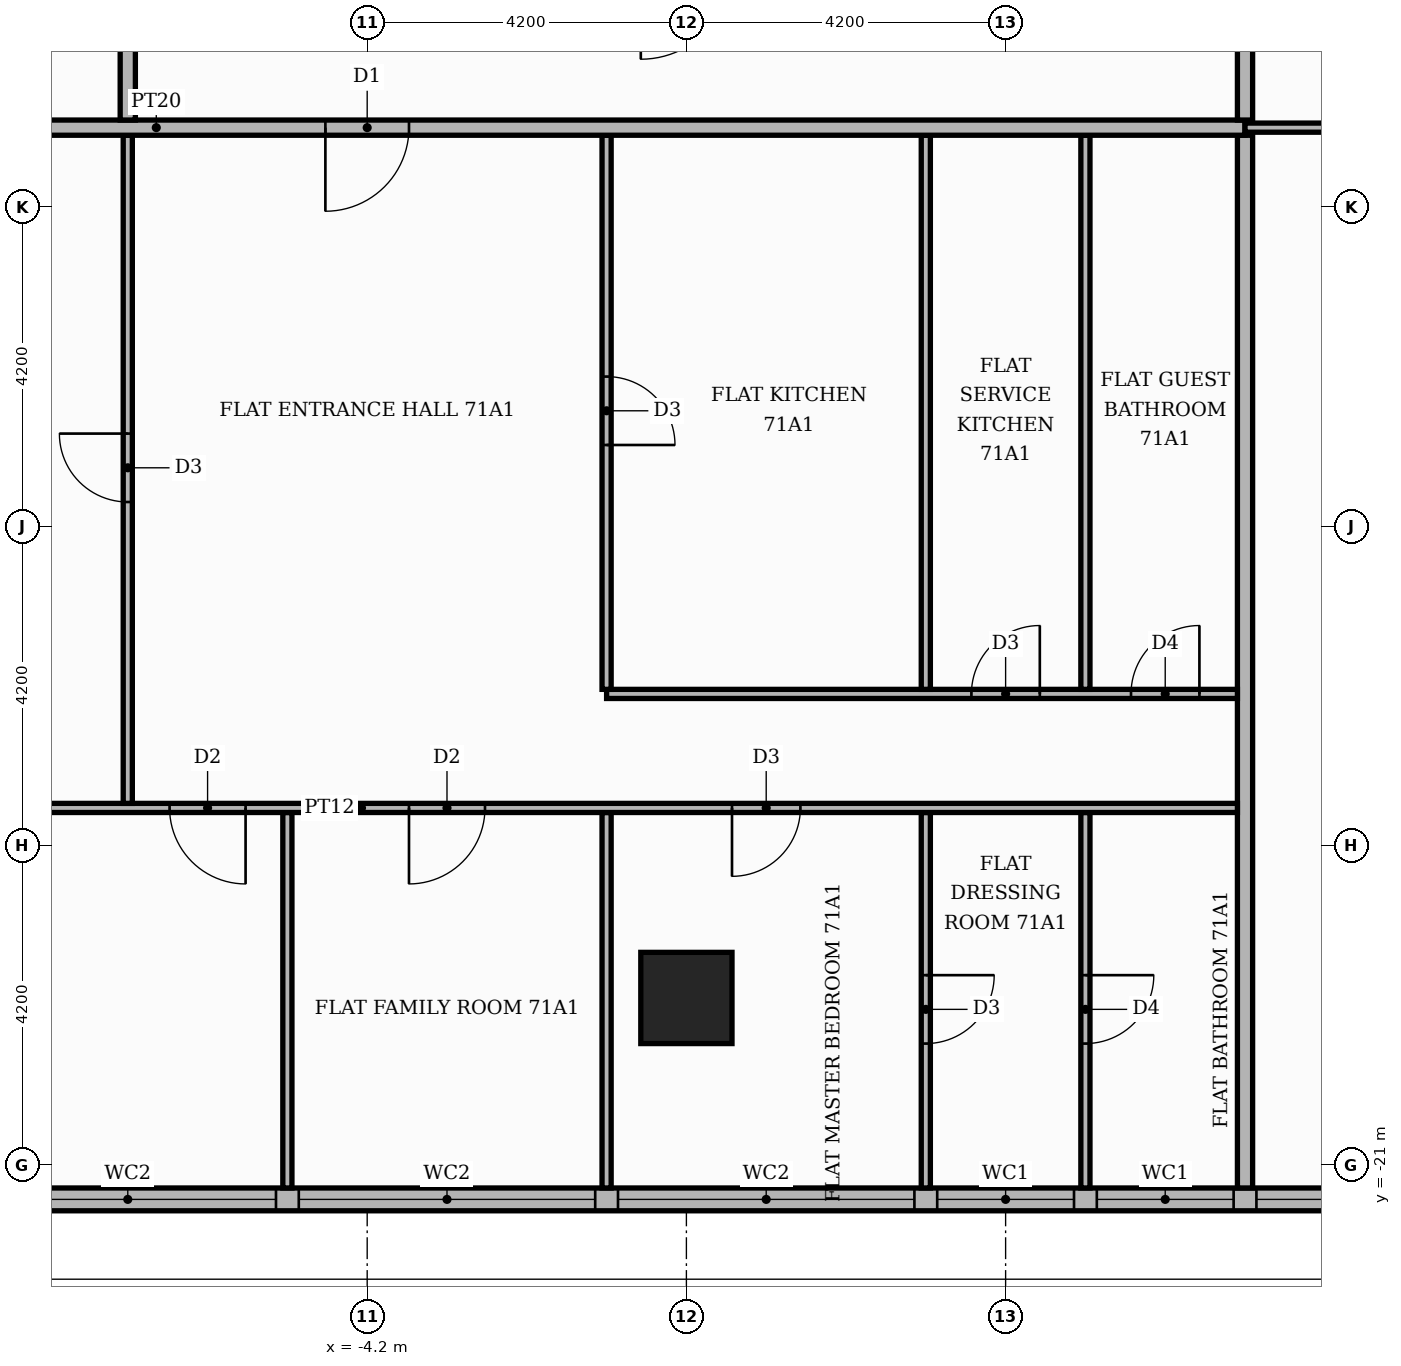
"""IFC4 building model, lengths in metres.
Left out: names, types, materials, properties, quantities, classifications, styles, units other than length and angle.
Written with IfcOpenShell. Run it as: python <this file> out.ifc"""

import sys

from ifc_helpers import new_model, si_unit, direction, frame, frame_2d, origin, origin_2d, place, context, subcontext, project, spatial, rectangle, extrude, element, fill, save


model = new_model("IFC4")
c1 = context("Model", 3, precision=1e-05, world=origin(), true_north=direction((0.0, 1.0)))
c2 = subcontext(c1, "Body", "Model", "MODEL_VIEW")
j1 = project(units=[si_unit("LENGTHUNIT", "METRE"), si_unit("PLANEANGLEUNIT", "RADIAN")], contexts=[c1])
p1 = place(None, origin())
s1 = spatial("IfcSite", under=j1, at=p1, CompositionType="ELEMENT")
p2 = place(p1, origin())
s2 = spatial("IfcBuilding", under=s1, at=p2, CompositionType="ELEMENT")
p3 = place(p2, frame((0.0, 0.0, 296.7)))
s3 = spatial("IfcBuildingStorey", under=s2, at=p3, CompositionType="ELEMENT", Elevation=296.7)
p4 = place(p3, frame((0.0, -18.8, 0.0), z_axis=(0.0, 0.0, 1.0), x_axis=(1.0, 0.0, 0.0)))
e1 = element("IfcColumn", 1, at=p4, inside=s3, PredefinedType="COLUMN", context=c2, shape_type="SweptSolid", body=[
    extrude(rectangle(XDim=1.2, YDim=1.2, at=origin_2d()), origin(), (0.0, 0.0, 1.0), 3.9),
])
p5 = place(p3, frame((-15.8, -21.45, 0.0), z_axis=(0.0, 0.0, 1.0), x_axis=(1.0, 0.0, 0.0)))
e2 = element("IfcWall", 2, at=p5, inside=s3, PredefinedType="STANDARD", context=c2, shape_type="SweptSolid", body=[
    extrude(rectangle(XDim=31.9, YDim=0.3, at=frame_2d((15.95, 0.0))), origin(), (0.0, 0.0, 1.0), 3.55),
])
p6 = place(p5, frame((0.2, 0.0, 0.6)))
e3 = element("IfcOpeningElement", 3, at=p6, cuts=e2, PredefinedType="OPENING", context=c2, shape_type="SweptSolid", body=[
    extrude(rectangle(XDim=6.0, YDim=2.4, at=frame_2d((3.0, 1.2))), frame((0.0, 0.16, 0.0), z_axis=(0.0, -1.0, 0.0), x_axis=(1.0, 0.0, 0.0)), (0.0, 0.0, 1.0), 0.32),
])
p7 = place(p5, frame((6.5, 0.0, 0.6)))
e4 = element("IfcOpeningElement", 4, at=p7, cuts=e2, PredefinedType="OPENING", context=c2, shape_type="SweptSolid", body=[
    extrude(rectangle(XDim=3.9, YDim=2.4, at=frame_2d((1.95, 1.2))), frame((0.0, 0.16, 0.0), z_axis=(0.0, -1.0, 0.0), x_axis=(1.0, 0.0, 0.0)), (0.0, 0.0, 1.0), 0.32),
])
p8 = place(p5, frame((10.7, 0.0, 0.6)))
e5 = element("IfcOpeningElement", 5, at=p8, cuts=e2, PredefinedType="OPENING", context=c2, shape_type="SweptSolid", body=[
    extrude(rectangle(XDim=3.9, YDim=2.4, at=frame_2d((1.95, 1.2))), frame((0.0, 0.16, 0.0), z_axis=(0.0, -1.0, 0.0), x_axis=(1.0, 0.0, 0.0)), (0.0, 0.0, 1.0), 0.32),
])
p9 = place(p5, frame((14.9, 0.0, 0.6)))
e6 = element("IfcOpeningElement", 6, at=p9, cuts=e2, PredefinedType="OPENING", context=c2, shape_type="SweptSolid", body=[
    extrude(rectangle(XDim=3.9, YDim=2.4, at=frame_2d((1.95, 1.2))), frame((0.0, 0.16, 0.0), z_axis=(0.0, -1.0, 0.0), x_axis=(1.0, 0.0, 0.0)), (0.0, 0.0, 1.0), 0.32),
])
p10 = place(p5, frame((19.1, 0.0, 0.6)))
e7 = element("IfcOpeningElement", 7, at=p10, cuts=e2, PredefinedType="OPENING", context=c2, shape_type="SweptSolid", body=[
    extrude(rectangle(XDim=1.8, YDim=2.4, at=frame_2d((0.9, 1.2))), frame((0.0, 0.16, 0.0), z_axis=(0.0, -1.0, 0.0), x_axis=(1.0, 0.0, 0.0)), (0.0, 0.0, 1.0), 0.32),
])
p11 = place(p5, frame((21.2, 0.0, 0.6)))
e8 = element("IfcOpeningElement", 8, at=p11, cuts=e2, PredefinedType="OPENING", context=c2, shape_type="SweptSolid", body=[
    extrude(rectangle(XDim=1.8, YDim=2.4, at=frame_2d((0.9, 1.2))), frame((0.0, 0.16, 0.0), z_axis=(0.0, -1.0, 0.0), x_axis=(1.0, 0.0, 0.0)), (0.0, 0.0, 1.0), 0.32),
])
p12 = place(p5, frame((23.3, 0.0, 0.6)))
e9 = element("IfcOpeningElement", 9, at=p12, cuts=e2, PredefinedType="OPENING", context=c2, shape_type="SweptSolid", body=[
    extrude(rectangle(XDim=6.0, YDim=2.4, at=frame_2d((3.0, 1.2))), frame((0.0, 0.16, 0.0), z_axis=(0.0, -1.0, 0.0), x_axis=(1.0, 0.0, 0.0)), (0.0, 0.0, 1.0), 0.32),
])
for number, where, z_axis, x_axis in (
    (10, (-5.25, -21.3, 0.0), (0.0, 0.0, 1.0), (0.0, 1.0, 0.0)),
    (11, (-1.05, -21.3, 0.0), (0.0, 0.0, 1.0), (0.0, 1.0, 0.0)),
):
    element("IfcWall", number, at=place(p3, frame(where, z_axis=z_axis, x_axis=x_axis)), inside=s3, PredefinedType="PARTITIONING", context=c2, shape_type="SweptSolid", body=[
        extrude(rectangle(XDim=4.94, YDim=0.12, at=frame_2d((2.47, 0.0))), origin(), (0.0, 0.0, 1.0), 3.55),
    ])
p13 = place(p3, frame((3.15, -21.3, 0.0), z_axis=(0.0, 0.0, 1.0), x_axis=(0.0, 1.0, 0.0)))
e12 = element("IfcWall", 12, at=p13, inside=s3, PredefinedType="PARTITIONING", context=c2, shape_type="SweptSolid", body=[
    extrude(rectangle(XDim=4.94, YDim=0.12, at=frame_2d((2.47, 0.0))), origin(), (0.0, 0.0, 1.0), 3.55),
])
p14 = place(p13, frame((1.9, 0.0, 0.0)))
e13 = element("IfcOpeningElement", 13, at=p14, cuts=e12, PredefinedType="OPENING", context=c2, shape_type="SweptSolid", body=[
    extrude(rectangle(XDim=0.9, YDim=2.1, at=frame_2d((0.45, 1.05))), frame((0.0, 0.07, 0.0), z_axis=(0.0, -1.0, 0.0), x_axis=(1.0, 0.0, 0.0)), (0.0, 0.0, 1.0), 0.14),
])
p15 = place(p3, frame((5.25, -21.3, 0.0), z_axis=(0.0, 0.0, 1.0), x_axis=(0.0, 1.0, 0.0)))
e14 = element("IfcWall", 14, at=p15, inside=s3, PredefinedType="PARTITIONING", context=c2, shape_type="SweptSolid", body=[
    extrude(rectangle(XDim=4.94, YDim=0.12, at=frame_2d((2.47, 0.0))), origin(), (0.0, 0.0, 1.0), 3.55),
])
p16 = place(p15, frame((1.9, 0.0, 0.0)))
e15 = element("IfcOpeningElement", 15, at=p16, cuts=e14, PredefinedType="OPENING", context=c2, shape_type="SweptSolid", body=[
    extrude(rectangle(XDim=0.9, YDim=2.1, at=frame_2d((0.45, 1.05))), frame((0.0, 0.07, 0.0), z_axis=(0.0, -1.0, 0.0), x_axis=(1.0, 0.0, 0.0)), (0.0, 0.0, 1.0), 0.14),
])
p17 = place(p3, frame((7.35, -21.3, 0.0), z_axis=(0.0, 0.0, 1.0), x_axis=(0.0, 1.0, 0.0)))
e16 = element("IfcWall", 16, at=p17, inside=s3, PredefinedType="PARTITIONING", context=c2, shape_type="SweptSolid", body=[
    extrude(rectangle(XDim=13.85, YDim=0.2, at=frame_2d((6.925, 0.0))), origin(), (0.0, 0.0, 1.0), 3.55),
])
p18 = place(p3, frame((-15.8, -16.3, 0.0), z_axis=(0.0, 0.0, 1.0), x_axis=(1.0, 0.0, 0.0)))
e17 = element("IfcWall", 17, at=p18, inside=s3, PredefinedType="PARTITIONING", context=c2, shape_type="SweptSolid", body=[
    extrude(rectangle(XDim=23.05, YDim=0.12, at=frame_2d((11.525, 0.0))), origin(), (0.0, 0.0, 1.0), 3.55),
])
p19 = place(p18, frame((9.0, 0.0, 0.0)))
e18 = element("IfcOpeningElement", 18, at=p19, cuts=e17, PredefinedType="OPENING", context=c2, shape_type="SweptSolid", body=[
    extrude(rectangle(XDim=1.0, YDim=2.1, at=frame_2d((0.5, 1.05))), frame((0.0, 0.07, 0.0), z_axis=(0.0, -1.0, 0.0), x_axis=(1.0, 0.0, 0.0)), (0.0, 0.0, 1.0), 0.14),
])
p20 = place(p18, frame((12.15, 0.0, 0.0)))
e19 = element("IfcOpeningElement", 19, at=p20, cuts=e17, PredefinedType="OPENING", context=c2, shape_type="SweptSolid", body=[
    extrude(rectangle(XDim=1.0, YDim=2.1, at=frame_2d((0.5, 1.05))), frame((0.0, 0.07, 0.0), z_axis=(0.0, -1.0, 0.0), x_axis=(1.0, 0.0, 0.0)), (0.0, 0.0, 1.0), 0.14),
])
p21 = place(p18, frame((16.4, 0.0, 0.0)))
e20 = element("IfcOpeningElement", 20, at=p21, cuts=e17, PredefinedType="OPENING", context=c2, shape_type="SweptSolid", body=[
    extrude(rectangle(XDim=0.9, YDim=2.1, at=frame_2d((0.45, 1.05))), frame((0.0, 0.07, 0.0), z_axis=(0.0, -1.0, 0.0), x_axis=(1.0, 0.0, 0.0)), (0.0, 0.0, 1.0), 0.14),
])
p22 = place(p3, frame((-7.35, -16.24, 0.0), z_axis=(0.0, 0.0, 1.0), x_axis=(0.0, 1.0, 0.0)))
e21 = element("IfcWall", 21, at=p22, inside=s3, PredefinedType="PARTITIONING", context=c2, shape_type="SweptSolid", body=[
    extrude(rectangle(XDim=8.79, YDim=0.12, at=frame_2d((4.395, 0.0))), origin(), (0.0, 0.0, 1.0), 3.55),
])
p23 = place(p22, frame((3.965, 0.0, 0.0)))
e22 = element("IfcOpeningElement", 22, at=p23, cuts=e21, PredefinedType="OPENING", context=c2, shape_type="SweptSolid", body=[
    extrude(rectangle(XDim=0.9, YDim=2.1, at=frame_2d((0.45, 1.05))), frame((0.0, 0.07, 0.0), z_axis=(0.0, -1.0, 0.0), x_axis=(1.0, 0.0, 0.0)), (0.0, 0.0, 1.0), 0.14),
])
p24 = place(p3, frame((-1.05, -14.8, 0.0), z_axis=(0.0, 0.0, 1.0), x_axis=(1.0, 0.0, 0.0)))
e23 = element("IfcWall", 23, at=p24, inside=s3, PredefinedType="PARTITIONING", context=c2, shape_type="SweptSolid", body=[
    extrude(rectangle(XDim=8.3, YDim=0.12, at=frame_2d((4.15, 0.0))), origin(), (0.0, 0.0, 1.0), 3.55),
])
p25 = place(p24, frame((4.8, 0.0, 0.0)))
e24 = element("IfcOpeningElement", 24, at=p25, cuts=e23, PredefinedType="OPENING", context=c2, shape_type="SweptSolid", body=[
    extrude(rectangle(XDim=0.9, YDim=2.1, at=frame_2d((0.45, 1.05))), frame((0.0, 0.07, 0.0), z_axis=(0.0, -1.0, 0.0), x_axis=(1.0, 0.0, 0.0)), (0.0, 0.0, 1.0), 0.14),
])
p26 = place(p24, frame((6.9, 0.0, 0.0)))
e25 = element("IfcOpeningElement", 25, at=p26, cuts=e23, PredefinedType="OPENING", context=c2, shape_type="SweptSolid", body=[
    extrude(rectangle(XDim=0.9, YDim=2.1, at=frame_2d((0.45, 1.05))), frame((0.0, 0.07, 0.0), z_axis=(0.0, -1.0, 0.0), x_axis=(1.0, 0.0, 0.0)), (0.0, 0.0, 1.0), 0.14),
])
p27 = place(p3, frame((-1.05, -14.74, 0.0), z_axis=(0.0, 0.0, 1.0), x_axis=(0.0, 1.0, 0.0)))
e26 = element("IfcWall", 26, at=p27, inside=s3, PredefinedType="PARTITIONING", context=c2, shape_type="SweptSolid", body=[
    extrude(rectangle(XDim=7.29, YDim=0.12, at=frame_2d((3.645, 0.0))), origin(), (0.0, 0.0, 1.0), 3.55),
])
p28 = place(p27, frame((3.215, 0.0, 0.0)))
e27 = element("IfcOpeningElement", 27, at=p28, cuts=e26, PredefinedType="OPENING", context=c2, shape_type="SweptSolid", body=[
    extrude(rectangle(XDim=0.9, YDim=2.1, at=frame_2d((0.45, 1.05))), frame((0.0, 0.07, 0.0), z_axis=(0.0, -1.0, 0.0), x_axis=(1.0, 0.0, 0.0)), (0.0, 0.0, 1.0), 0.14),
])
for number, where, z_axis, x_axis in (
    (28, (3.15, -14.74, 0.0), (0.0, 0.0, 1.0), (0.0, 1.0, 0.0)),
    (29, (5.25, -14.74, 0.0), (0.0, 0.0, 1.0), (0.0, 1.0, 0.0)),
):
    element("IfcWall", number, at=place(p3, frame(where, z_axis=z_axis, x_axis=x_axis)), inside=s3, PredefinedType="PARTITIONING", context=c2, shape_type="SweptSolid", body=[
        extrude(rectangle(XDim=7.29, YDim=0.12, at=frame_2d((3.645, 0.0))), origin(), (0.0, 0.0, 1.0), 3.55),
    ])
p29 = place(p3, frame((-21.3, -7.35, 0.0), z_axis=(0.0, 0.0, 1.0), x_axis=(1.0, 0.0, 0.0)))
e30 = element("IfcWall", 30, at=p29, inside=s3, PredefinedType="PARTITIONING", context=c2, shape_type="SweptSolid", body=[
    extrude(rectangle(XDim=28.65, YDim=0.2, at=frame_2d((14.325, 0.0))), origin(), (0.0, 0.0, 1.0), 3.55),
])
p30 = place(p29, frame((16.55, 0.0, 0.0)))
e31 = element("IfcOpeningElement", 31, at=p30, cuts=e30, PredefinedType="OPENING", context=c2, shape_type="SweptSolid", body=[
    extrude(rectangle(XDim=1.1, YDim=2.4, at=frame_2d((0.55, 1.2))), frame((0.0, 0.11, 0.0), z_axis=(0.0, -1.0, 0.0), x_axis=(1.0, 0.0, 0.0)), (0.0, 0.0, 1.0), 0.22),
])
p31 = place(p3, frame((7.35, -7.35, 0.0), z_axis=(0.0, 0.0, 1.0), x_axis=(1.0, 0.0, 0.0)))
e32 = element("IfcWall", 32, at=p31, inside=s3, PredefinedType="PARTITIONING", context=c2, shape_type="SweptSolid", body=[
    extrude(rectangle(XDim=8.35, YDim=0.12, at=frame_2d((4.175, 0.0))), origin(), (0.0, 0.0, 1.0), 3.55),
])
p32 = place(p31, frame((3.725, 0.0, 0.0)))
e33 = element("IfcOpeningElement", 33, at=p32, cuts=e32, PredefinedType="OPENING", context=c2, shape_type="SweptSolid", body=[
    extrude(rectangle(XDim=0.9, YDim=2.1, at=frame_2d((0.45, 1.05))), frame((0.0, 0.07, 0.0), z_axis=(0.0, -1.0, 0.0), x_axis=(1.0, 0.0, 0.0)), (0.0, 0.0, 1.0), 0.14),
])
p33 = place(p3, frame((-7.35, -7.25, 0.0), z_axis=(0.0, 0.0, 1.0), x_axis=(0.0, 1.0, 0.0)))
e34 = element("IfcWall", 34, at=p33, inside=s3, PredefinedType="PARTITIONING", context=c2, shape_type="SweptSolid", body=[
    extrude(rectangle(XDim=14.5, YDim=0.2, at=frame_2d((7.25, 0.0))), origin(), (0.0, 0.0, 1.0), 3.55),
])
p34 = place(p33, frame((11.95, 0.0, 0.0)))
e35 = element("IfcOpeningElement", 35, at=p34, cuts=e34, PredefinedType="OPENING", context=c2, shape_type="SweptSolid", body=[
    extrude(rectangle(XDim=1.1, YDim=2.4, at=frame_2d((0.55, 1.2))), frame((0.0, 0.11, 0.0), z_axis=(0.0, -1.0, 0.0), x_axis=(1.0, 0.0, 0.0)), (0.0, 0.0, 1.0), 0.22),
])
p35 = place(p3, frame((7.35, -7.25, 0.0), z_axis=(0.0, 0.0, 1.0), x_axis=(0.0, 1.0, 0.0)))
e36 = element("IfcWall", 36, at=p35, inside=s3, PredefinedType="PARTITIONING", context=c2, shape_type="SweptSolid", body=[
    extrude(rectangle(XDim=14.5, YDim=0.2, at=frame_2d((7.25, 0.0))), origin(), (0.0, 0.0, 1.0), 3.55),
])
p36 = place(p35, frame((2.5, 0.0, 0.0)))
e37 = element("IfcOpeningElement", 37, at=p36, cuts=e36, PredefinedType="OPENING", context=c2, shape_type="SweptSolid", body=[
    extrude(rectangle(XDim=1.1, YDim=2.4, at=frame_2d((0.55, 1.2))), frame((0.0, 0.11, 0.0), z_axis=(0.0, -1.0, 0.0), x_axis=(1.0, 0.0, 0.0)), (0.0, 0.0, 1.0), 0.22),
])
p37 = place(p7, origin())
e38 = element("IfcWindow", 38, at=p37, inside=s3, PartitioningType="SINGLE_PANEL", PredefinedType="WINDOW", context=c2, shape_type="SweptSolid", body=[
    extrude(rectangle(XDim=3.9, YDim=2.4, at=frame_2d((1.95, 1.2))), frame((0.0, 0.03, 0.0), z_axis=(0.0, -1.0, 0.0), x_axis=(1.0, 0.0, 0.0)), (0.0, 0.0, 1.0), 0.06),
])
fill(e4, e38)
p38 = place(p8, origin())
e39 = element("IfcWindow", 39, at=p38, inside=s3, PartitioningType="SINGLE_PANEL", PredefinedType="WINDOW", context=c2, shape_type="SweptSolid", body=[
    extrude(rectangle(XDim=3.9, YDim=2.4, at=frame_2d((1.95, 1.2))), frame((0.0, 0.03, 0.0), z_axis=(0.0, -1.0, 0.0), x_axis=(1.0, 0.0, 0.0)), (0.0, 0.0, 1.0), 0.06),
])
fill(e5, e39)
p39 = place(p9, origin())
e40 = element("IfcWindow", 40, at=p39, inside=s3, PartitioningType="SINGLE_PANEL", PredefinedType="WINDOW", context=c2, shape_type="SweptSolid", body=[
    extrude(rectangle(XDim=3.9, YDim=2.4, at=frame_2d((1.95, 1.2))), frame((0.0, 0.03, 0.0), z_axis=(0.0, -1.0, 0.0), x_axis=(1.0, 0.0, 0.0)), (0.0, 0.0, 1.0), 0.06),
])
fill(e6, e40)
p40 = place(p10, origin())
e41 = element("IfcWindow", 41, at=p40, inside=s3, PartitioningType="SINGLE_PANEL", PredefinedType="WINDOW", context=c2, shape_type="SweptSolid", body=[
    extrude(rectangle(XDim=1.8, YDim=2.4, at=frame_2d((0.9, 1.2))), frame((0.0, 0.03, 0.0), z_axis=(0.0, -1.0, 0.0), x_axis=(1.0, 0.0, 0.0)), (0.0, 0.0, 1.0), 0.06),
])
fill(e7, e41)
p41 = place(p11, origin())
e42 = element("IfcWindow", 42, at=p41, inside=s3, PartitioningType="SINGLE_PANEL", PredefinedType="WINDOW", context=c2, shape_type="SweptSolid", body=[
    extrude(rectangle(XDim=1.8, YDim=2.4, at=frame_2d((0.9, 1.2))), frame((0.0, 0.03, 0.0), z_axis=(0.0, -1.0, 0.0), x_axis=(1.0, 0.0, 0.0)), (0.0, 0.0, 1.0), 0.06),
])
fill(e8, e42)
p42 = place(p12, origin())
e43 = element("IfcWindow", 43, at=p42, inside=s3, PartitioningType="SINGLE_PANEL", PredefinedType="WINDOW", context=c2, shape_type="SweptSolid", body=[
    extrude(rectangle(XDim=6.0, YDim=2.4, at=frame_2d((3.0, 1.2))), frame((0.0, 0.03, 0.0), z_axis=(0.0, -1.0, 0.0), x_axis=(1.0, 0.0, 0.0)), (0.0, 0.0, 1.0), 0.06),
])
fill(e9, e43)
p43 = place(p30, frame((1.1, 0.0, 0.0), z_axis=(0.0, 0.0, 1.0), x_axis=(-1.0, 0.0, 0.0)))
e44 = element("IfcDoor", 44, at=p43, inside=s3, OperationType="SINGLE_SWING_LEFT", PredefinedType="DOOR", context=c2, shape_type="SweptSolid", body=[
    extrude(rectangle(XDim=1.1, YDim=2.4, at=frame_2d((0.55, 1.2))), frame((0.0, 0.025, 0.0), z_axis=(0.0, -1.0, 0.0), x_axis=(1.0, 0.0, 0.0)), (0.0, 0.0, 1.0), 0.05),
])
fill(e31, e44)
p44 = place(p23, origin())
e45 = element("IfcDoor", 45, at=p44, inside=s3, OperationType="SINGLE_SWING_RIGHT", PredefinedType="DOOR", context=c2, shape_type="SweptSolid", body=[
    extrude(rectangle(XDim=0.9, YDim=2.1, at=frame_2d((0.45, 1.05))), frame((0.0, 0.025, 0.0), z_axis=(0.0, -1.0, 0.0), x_axis=(1.0, 0.0, 0.0)), (0.0, 0.0, 1.0), 0.05),
])
fill(e22, e45)
p45 = place(p28, frame((0.9, 0.0, 0.0), z_axis=(0.0, 0.0, 1.0), x_axis=(-1.0, 0.0, 0.0)))
e46 = element("IfcDoor", 46, at=p45, inside=s3, OperationType="SINGLE_SWING_LEFT", PredefinedType="DOOR", context=c2, shape_type="SweptSolid", body=[
    extrude(rectangle(XDim=0.9, YDim=2.1, at=frame_2d((0.45, 1.05))), frame((0.0, 0.025, 0.0), z_axis=(0.0, -1.0, 0.0), x_axis=(1.0, 0.0, 0.0)), (0.0, 0.0, 1.0), 0.05),
])
fill(e27, e46)
p46 = place(p25, origin())
e47 = element("IfcDoor", 47, at=p46, inside=s3, OperationType="SINGLE_SWING_RIGHT", PredefinedType="DOOR", context=c2, shape_type="SweptSolid", body=[
    extrude(rectangle(XDim=0.9, YDim=2.1, at=frame_2d((0.45, 1.05))), frame((0.0, 0.025, 0.0), z_axis=(0.0, -1.0, 0.0), x_axis=(1.0, 0.0, 0.0)), (0.0, 0.0, 1.0), 0.05),
])
fill(e24, e47)
p47 = place(p26, origin())
e48 = element("IfcDoor", 48, at=p47, inside=s3, OperationType="SINGLE_SWING_RIGHT", PredefinedType="DOOR", context=c2, shape_type="SweptSolid", body=[
    extrude(rectangle(XDim=0.9, YDim=2.1, at=frame_2d((0.45, 1.05))), frame((0.0, 0.025, 0.0), z_axis=(0.0, -1.0, 0.0), x_axis=(1.0, 0.0, 0.0)), (0.0, 0.0, 1.0), 0.05),
])
fill(e25, e48)
p48 = place(p19, frame((1.0, 0.0, 0.0), z_axis=(0.0, 0.0, 1.0), x_axis=(-1.0, 0.0, 0.0)))
e49 = element("IfcDoor", 49, at=p48, inside=s3, OperationType="SINGLE_SWING_RIGHT", PredefinedType="DOOR", context=c2, shape_type="SweptSolid", body=[
    extrude(rectangle(XDim=1.0, YDim=2.1, at=frame_2d((0.5, 1.05))), frame((0.0, 0.025, 0.0), z_axis=(0.0, -1.0, 0.0), x_axis=(1.0, 0.0, 0.0)), (0.0, 0.0, 1.0), 0.05),
])
fill(e18, e49)
p49 = place(p20, frame((1.0, 0.0, 0.0), z_axis=(0.0, 0.0, 1.0), x_axis=(-1.0, 0.0, 0.0)))
e50 = element("IfcDoor", 50, at=p49, inside=s3, OperationType="SINGLE_SWING_LEFT", PredefinedType="DOOR", context=c2, shape_type="SweptSolid", body=[
    extrude(rectangle(XDim=1.0, YDim=2.1, at=frame_2d((0.5, 1.05))), frame((0.0, 0.025, 0.0), z_axis=(0.0, -1.0, 0.0), x_axis=(1.0, 0.0, 0.0)), (0.0, 0.0, 1.0), 0.05),
])
fill(e19, e50)
p50 = place(p21, frame((0.9, 0.0, 0.0), z_axis=(0.0, 0.0, 1.0), x_axis=(-1.0, 0.0, 0.0)))
e51 = element("IfcDoor", 51, at=p50, inside=s3, OperationType="SINGLE_SWING_LEFT", PredefinedType="DOOR", context=c2, shape_type="SweptSolid", body=[
    extrude(rectangle(XDim=0.9, YDim=2.1, at=frame_2d((0.45, 1.05))), frame((0.0, 0.025, 0.0), z_axis=(0.0, -1.0, 0.0), x_axis=(1.0, 0.0, 0.0)), (0.0, 0.0, 1.0), 0.05),
])
fill(e20, e51)
p51 = place(p14, frame((0.9, 0.0, 0.0), z_axis=(0.0, 0.0, 1.0), x_axis=(-1.0, 0.0, 0.0)))
e52 = element("IfcDoor", 52, at=p51, inside=s3, OperationType="SINGLE_SWING_RIGHT", PredefinedType="DOOR", context=c2, shape_type="SweptSolid", body=[
    extrude(rectangle(XDim=0.9, YDim=2.1, at=frame_2d((0.45, 1.05))), frame((0.0, 0.025, 0.0), z_axis=(0.0, -1.0, 0.0), x_axis=(1.0, 0.0, 0.0)), (0.0, 0.0, 1.0), 0.05),
])
fill(e13, e52)
p52 = place(p16, frame((0.9, 0.0, 0.0), z_axis=(0.0, 0.0, 1.0), x_axis=(-1.0, 0.0, 0.0)))
e53 = element("IfcDoor", 53, at=p52, inside=s3, OperationType="SINGLE_SWING_RIGHT", PredefinedType="DOOR", context=c2, shape_type="SweptSolid", body=[
    extrude(rectangle(XDim=0.9, YDim=2.1, at=frame_2d((0.45, 1.05))), frame((0.0, 0.025, 0.0), z_axis=(0.0, -1.0, 0.0), x_axis=(1.0, 0.0, 0.0)), (0.0, 0.0, 1.0), 0.05),
])
fill(e15, e53)
save(model, sys.argv[1])
